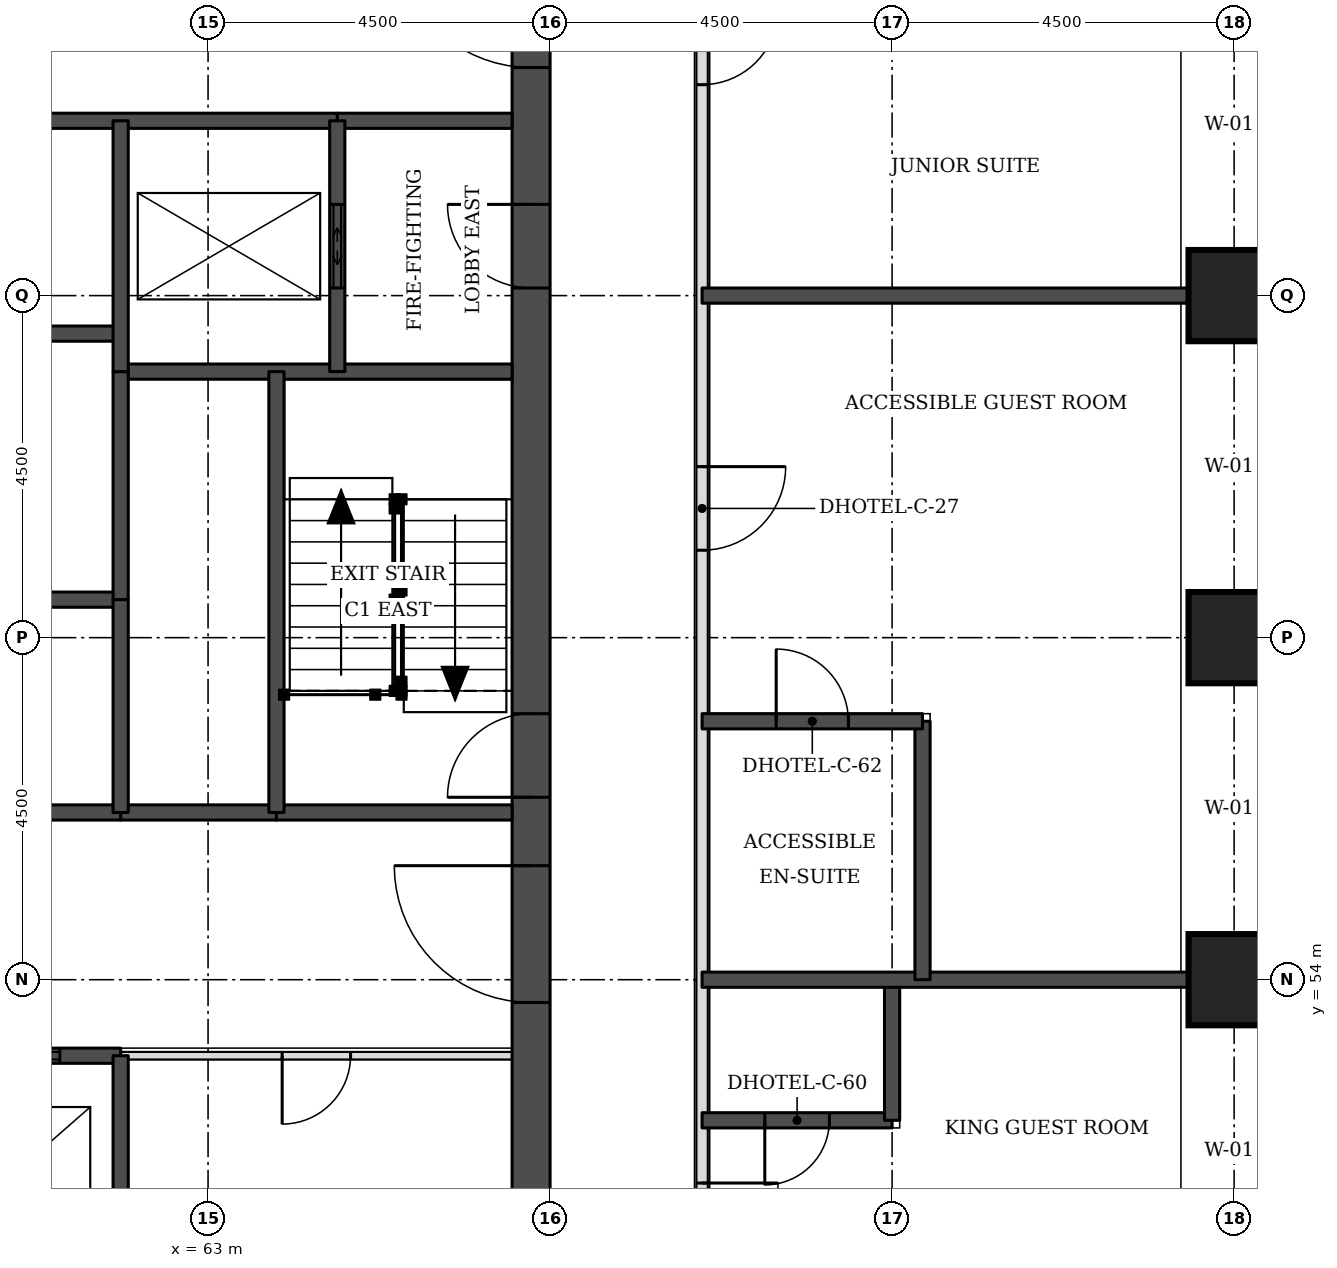
"""IFC4 building model, lengths in metres.
Left out: names, types, materials, properties, quantities, classifications, styles, units other than length and angle.
Written with IfcOpenShell. Run it as: python <this file> out.ifc"""

import sys

from ifc_helpers import new_model, si_unit, direction, frame, frame_2d, origin, origin_2d, place, context, subcontext, project, spatial, rectangle, extrude, element, fill, save


model = new_model("IFC4")
c1 = context("Model", 3, precision=1e-05, world=origin(), true_north=direction((0.0, 1.0)))
c2 = subcontext(c1, "Body", "Model", "MODEL_VIEW")
j1 = project(units=[si_unit("LENGTHUNIT", "METRE"), si_unit("PLANEANGLEUNIT", "RADIAN")], contexts=[c1])
p1 = place(None, origin())
s1 = spatial("IfcSite", under=j1, at=p1, CompositionType="ELEMENT")
p2 = place(p1, origin())
s2 = spatial("IfcBuilding", under=s1, at=p2, CompositionType="ELEMENT")
p3 = place(p2, frame((0.0, 0.0, 33.0)))
s3 = spatial("IfcBuildingStorey", under=s2, at=p3, CompositionType="ELEMENT", Elevation=33.0)
for number, where, z_axis, x_axis in (
    (1, (76.5, 54.0, 0.0), (0.0, 0.0, 1.0), (1.0, 0.0, 0.0)),
    (2, (76.5, 58.5, 0.0), (0.0, 0.0, 1.0), (1.0, 0.0, 0.0)),
    (3, (76.5, 63.0, 0.0), (0.0, 0.0, 1.0), (1.0, 0.0, 0.0)),
):
    element("IfcColumn", number, at=place(p3, frame(where, z_axis=z_axis, x_axis=x_axis)), inside=s3, PredefinedType="COLUMN", context=c2, shape_type="SweptSolid", body=[
        extrude(rectangle(XDim=1.2, YDim=1.2, at=origin_2d()), origin(), (0.0, 0.0, 1.0), 3.3),
    ])
p4 = place(p3, frame((67.25, 49.5, 0.0), z_axis=(0.0, 0.0, 1.0), x_axis=(0.0, 1.0, 0.0)))
e4 = element("IfcWall", 4, at=p4, inside=s3, PredefinedType="SHEAR", context=c2, shape_type="SweptSolid", body=[
    extrude(rectangle(XDim=22.5, YDim=0.5, at=frame_2d((11.25, 0.0))), origin(), (0.0, 0.0, 1.0), 3.3),
])
p5 = place(p4, frame((4.2, 0.0, 0.0)))
e5 = element("IfcOpeningElement", 5, at=p5, cuts=e4, PredefinedType="OPENING", context=c2, shape_type="SweptSolid", body=[
    extrude(rectangle(XDim=1.8, YDim=2.1, at=frame_2d((0.9, 1.05))), frame((0.0, 0.26, 0.0), z_axis=(0.0, -1.0, 0.0), x_axis=(1.0, 0.0, 0.0)), (0.0, 0.0, 1.0), 0.52),
])
p6 = place(p4, frame((6.9, 0.0, 0.0)))
e6 = element("IfcOpeningElement", 6, at=p6, cuts=e4, PredefinedType="OPENING", context=c2, shape_type="SweptSolid", body=[
    extrude(rectangle(XDim=1.1, YDim=2.1, at=frame_2d((0.55, 1.05))), frame((0.0, 0.26, 0.0), z_axis=(0.0, -1.0, 0.0), x_axis=(1.0, 0.0, 0.0)), (0.0, 0.0, 1.0), 0.52),
])
p7 = place(p4, frame((13.6, 0.0, 0.0)))
e7 = element("IfcOpeningElement", 7, at=p7, cuts=e4, PredefinedType="OPENING", context=c2, shape_type="SweptSolid", body=[
    extrude(rectangle(XDim=1.1, YDim=2.1, at=frame_2d((0.55, 1.05))), frame((0.0, 0.26, 0.0), z_axis=(0.0, -1.0, 0.0), x_axis=(1.0, 0.0, 0.0)), (0.0, 0.0, 1.0), 0.52),
])
p8 = place(p4, frame((16.5, 0.0, 0.0)))
e8 = element("IfcOpeningElement", 8, at=p8, cuts=e4, PredefinedType="OPENING", context=c2, shape_type="SweptSolid", body=[
    extrude(rectangle(XDim=1.8, YDim=2.1, at=frame_2d((0.9, 1.05))), frame((0.0, 0.26, 0.0), z_axis=(0.0, -1.0, 0.0), x_axis=(1.0, 0.0, 0.0)), (0.0, 0.0, 1.0), 0.52),
])
p9 = place(p3, frame((69.5, 47.5, 0.0), z_axis=(0.0, 0.0, 1.0), x_axis=(0.0, 1.0, 0.0)))
e9 = element("IfcWall", 9, at=p9, inside=s3, PredefinedType="PARTITIONING", context=c2, shape_type="SweptSolid", body=[
    extrude(rectangle(XDim=26.5, YDim=0.15, at=frame_2d((13.25, 0.0))), origin(), (0.0, 0.0, 1.0), 3.08),
])
p10 = place(p9, frame((25.053, 0.0, 0.0)))
e10 = element("IfcOpeningElement", 10, at=p10, cuts=e9, PredefinedType="OPENING", context=c2, shape_type="SweptSolid", body=[
    extrude(rectangle(XDim=1.0, YDim=2.1, at=frame_2d((0.5, 1.05))), frame((0.0, 0.085, 0.0), z_axis=(0.0, -1.0, 0.0), x_axis=(1.0, 0.0, 0.0)), (0.0, 0.0, 1.0), 0.17),
])
p11 = place(p9, frame((18.275, 0.0, 0.0)))
e11 = element("IfcOpeningElement", 11, at=p11, cuts=e9, PredefinedType="OPENING", context=c2, shape_type="SweptSolid", body=[
    extrude(rectangle(XDim=1.0, YDim=2.1, at=frame_2d((0.5, 1.05))), frame((0.0, 0.085, 0.0), z_axis=(0.0, -1.0, 0.0), x_axis=(1.0, 0.0, 0.0)), (0.0, 0.0, 1.0), 0.17),
])
p12 = place(p9, frame((12.15, 0.0, 0.0)))
e12 = element("IfcOpeningElement", 12, at=p12, cuts=e9, PredefinedType="OPENING", context=c2, shape_type="SweptSolid", body=[
    extrude(rectangle(XDim=1.1, YDim=2.1, at=frame_2d((0.55, 1.05))), frame((0.0, 0.085, 0.0), z_axis=(0.0, -1.0, 0.0), x_axis=(1.0, 0.0, 0.0)), (0.0, 0.0, 1.0), 0.17),
])
p13 = place(p9, frame((2.825, 0.0, 0.0)))
e13 = element("IfcOpeningElement", 13, at=p13, cuts=e9, PredefinedType="OPENING", context=c2, shape_type="SweptSolid", body=[
    extrude(rectangle(XDim=1.0, YDim=2.1, at=frame_2d((0.5, 1.05))), frame((0.0, 0.085, 0.0), z_axis=(0.0, -1.0, 0.0), x_axis=(1.0, 0.0, 0.0)), (0.0, 0.0, 1.0), 0.17),
])
p14 = place(p9, frame((0.447, 0.0, 0.0)))
e14 = element("IfcOpeningElement", 14, at=p14, cuts=e9, PredefinedType="OPENING", context=c2, shape_type="SweptSolid", body=[
    extrude(rectangle(XDim=1.0, YDim=2.1, at=frame_2d((0.5, 1.05))), frame((0.0, 0.085, 0.0), z_axis=(0.0, -1.0, 0.0), x_axis=(1.0, 0.0, 0.0)), (0.0, 0.0, 1.0), 0.17),
])
p15 = place(p3, frame((69.5, 52.15, 0.0), z_axis=(0.0, 0.0, 1.0), x_axis=(1.0, 0.0, 0.0)))
e15 = element("IfcWall", 15, at=p15, inside=s3, PredefinedType="SOLIDWALL", context=c2, shape_type="SweptSolid", body=[
    extrude(rectangle(XDim=2.5, YDim=0.2, at=frame_2d((1.25, 0.0))), origin(), (0.0, 0.0, 1.0), 3.08),
])
p16 = place(p15, frame((0.825, 0.0, 0.0)))
e16 = element("IfcOpeningElement", 16, at=p16, cuts=e15, PredefinedType="OPENING", context=c2, shape_type="SweptSolid", body=[
    extrude(rectangle(XDim=0.85, YDim=2.1, at=frame_2d((0.425, 1.05))), frame((0.0, 0.11, 0.0), z_axis=(0.0, -1.0, 0.0), x_axis=(1.0, 0.0, 0.0)), (0.0, 0.0, 1.0), 0.22),
])
p17 = place(p3, frame((72.0, 52.15, 0.0), z_axis=(0.0, 0.0, 1.0), x_axis=(0.0, 1.0, 0.0)))
e17 = element("IfcWall", 17, at=p17, inside=s3, PredefinedType="SOLIDWALL", context=c2, shape_type="SweptSolid", body=[
    extrude(rectangle(XDim=1.85, YDim=0.2, at=frame_2d((0.925, 0.0))), origin(), (0.0, 0.0, 1.0), 3.08),
])
p18 = place(p3, frame((69.5, 54.0, 0.0), z_axis=(0.0, 0.0, 1.0), x_axis=(1.0, 0.0, 0.0)))
e18 = element("IfcWall", 18, at=p18, inside=s3, PredefinedType="SOLIDWALL", context=c2, shape_type="SweptSolid", body=[
    extrude(rectangle(XDim=6.4, YDim=0.2, at=frame_2d((3.2, 0.0))), origin(), (0.0, 0.0, 1.0), 3.08),
])
p19 = place(p3, frame((72.4, 54.0, 0.0), z_axis=(0.0, 0.0, 1.0), x_axis=(0.0, 1.0, 0.0)))
e19 = element("IfcWall", 19, at=p19, inside=s3, PredefinedType="SOLIDWALL", context=c2, shape_type="SweptSolid", body=[
    extrude(rectangle(XDim=3.4, YDim=0.2, at=frame_2d((1.7, 0.0))), origin(), (0.0, 0.0, 1.0), 3.08),
])
p20 = place(p3, frame((69.5, 57.4, 0.0), z_axis=(0.0, 0.0, 1.0), x_axis=(1.0, 0.0, 0.0)))
e20 = element("IfcWall", 20, at=p20, inside=s3, PredefinedType="SOLIDWALL", context=c2, shape_type="SweptSolid", body=[
    extrude(rectangle(XDim=2.9, YDim=0.2, at=frame_2d((1.45, 0.0))), origin(), (0.0, 0.0, 1.0), 3.08),
])
p21 = place(p20, frame((0.975, 0.0, 0.0)))
e21 = element("IfcOpeningElement", 21, at=p21, cuts=e20, PredefinedType="OPENING", context=c2, shape_type="SweptSolid", body=[
    extrude(rectangle(XDim=0.95, YDim=2.1, at=frame_2d((0.475, 1.05))), frame((0.0, 0.11, 0.0), z_axis=(0.0, -1.0, 0.0), x_axis=(1.0, 0.0, 0.0)), (0.0, 0.0, 1.0), 0.22),
])
p22 = place(p3, frame((69.5, 63.0, 0.0), z_axis=(0.0, 0.0, 1.0), x_axis=(1.0, 0.0, 0.0)))
e22 = element("IfcWall", 22, at=p22, inside=s3, PredefinedType="SOLIDWALL", context=c2, shape_type="SweptSolid", body=[
    extrude(rectangle(XDim=6.4, YDim=0.2, at=frame_2d((3.2, 0.0))), origin(), (0.0, 0.0, 1.0), 3.08),
])
p23 = place(p3, frame((61.85, 53.0, 0.0), z_axis=(0.0, 0.0, 1.0), x_axis=(1.0, 0.0, 0.0)))
e23 = element("IfcWall", 23, at=p23, inside=s3, PredefinedType="PARTITIONING", context=c2, shape_type="SweptSolid", body=[
    extrude(rectangle(XDim=5.15, YDim=0.1, at=frame_2d((2.575, 0.0))), origin(), (0.0, 0.0, 1.0), 3.08),
])
p24 = place(p23, frame((2.125, 0.0, 0.0)))
e24 = element("IfcOpeningElement", 24, at=p24, cuts=e23, PredefinedType="OPENING", context=c2, shape_type="SweptSolid", body=[
    extrude(rectangle(XDim=0.9, YDim=2.1, at=frame_2d((0.45, 1.05))), frame((0.0, 0.06, 0.0), z_axis=(0.0, -1.0, 0.0), x_axis=(1.0, 0.0, 0.0)), (0.0, 0.0, 1.0), 0.12),
])
p25 = place(p3, frame((50.65, 53.0, 0.0), z_axis=(0.0, 0.0, 1.0), x_axis=(1.0, 0.0, 0.0)))
e25 = element("IfcWall", 25, at=p25, inside=s3, PredefinedType="SOLIDWALL", context=c2, shape_type="SweptSolid", body=[
    extrude(rectangle(XDim=11.2, YDim=0.2, at=frame_2d((5.6, 0.0))), origin(), (0.0, 0.0, 1.0), 3.08),
])
p26 = place(p25, frame((0.8, 0.0, 0.0)))
e26 = element("IfcOpeningElement", 26, at=p26, cuts=e25, PredefinedType="OPENING", context=c2, shape_type="SweptSolid", body=[
    extrude(rectangle(XDim=1.2, YDim=2.1, at=frame_2d((0.6, 1.05))), frame((0.0, 0.11, 0.0), z_axis=(0.0, -1.0, 0.0), x_axis=(1.0, 0.0, 0.0)), (0.0, 0.0, 1.0), 0.22),
])
p27 = place(p25, frame((3.6, 0.0, 0.0)))
e27 = element("IfcOpeningElement", 27, at=p27, cuts=e25, PredefinedType="OPENING", context=c2, shape_type="SweptSolid", body=[
    extrude(rectangle(XDim=1.2, YDim=2.1, at=frame_2d((0.6, 1.05))), frame((0.0, 0.11, 0.0), z_axis=(0.0, -1.0, 0.0), x_axis=(1.0, 0.0, 0.0)), (0.0, 0.0, 1.0), 0.22),
])
p28 = place(p25, frame((6.4, 0.0, 0.0)))
e28 = element("IfcOpeningElement", 28, at=p28, cuts=e25, PredefinedType="OPENING", context=c2, shape_type="SweptSolid", body=[
    extrude(rectangle(XDim=1.2, YDim=2.1, at=frame_2d((0.6, 1.05))), frame((0.0, 0.11, 0.0), z_axis=(0.0, -1.0, 0.0), x_axis=(1.0, 0.0, 0.0)), (0.0, 0.0, 1.0), 0.22),
])
p29 = place(p25, frame((9.2, 0.0, 0.0)))
e29 = element("IfcOpeningElement", 29, at=p29, cuts=e25, PredefinedType="OPENING", context=c2, shape_type="SweptSolid", body=[
    extrude(rectangle(XDim=1.2, YDim=2.1, at=frame_2d((0.6, 1.05))), frame((0.0, 0.11, 0.0), z_axis=(0.0, -1.0, 0.0), x_axis=(1.0, 0.0, 0.0)), (0.0, 0.0, 1.0), 0.22),
])
p30 = place(p3, frame((61.85, 56.2, 0.0), z_axis=(0.0, 0.0, 1.0), x_axis=(1.0, 0.0, 0.0)))
e30 = element("IfcWall", 30, at=p30, inside=s3, PredefinedType="SOLIDWALL", context=c2, shape_type="SweptSolid", body=[
    extrude(rectangle(XDim=2.05, YDim=0.2, at=frame_2d((1.025, 0.0))), origin(), (0.0, 0.0, 1.0), 3.08),
])
p31 = place(p3, frame((50.65, 56.2, 0.0), z_axis=(0.0, 0.0, 1.0), x_axis=(1.0, 0.0, 0.0)))
e31 = element("IfcWall", 31, at=p31, inside=s3, PredefinedType="SOLIDWALL", context=c2, shape_type="SweptSolid", body=[
    extrude(rectangle(XDim=11.2, YDim=0.2, at=frame_2d((5.6, 0.0))), origin(), (0.0, 0.0, 1.0), 3.08),
])
p32 = place(p3, frame((63.9, 56.2, 0.0), z_axis=(0.0, 0.0, 1.0), x_axis=(1.0, 0.0, 0.0)))
e32 = element("IfcWall", 32, at=p32, inside=s3, PredefinedType="SOLIDWALL", context=c2, shape_type="SweptSolid", body=[
    extrude(rectangle(XDim=3.1, YDim=0.2, at=frame_2d((1.55, 0.0))), origin(), (0.0, 0.0, 1.0), 3.08),
])
p33 = place(p3, frame((50.65, 59.0, 0.0), z_axis=(0.0, 0.0, 1.0), x_axis=(1.0, 0.0, 0.0)))
e33 = element("IfcWall", 33, at=p33, inside=s3, PredefinedType="SOLIDWALL", context=c2, shape_type="SweptSolid", body=[
    extrude(rectangle(XDim=11.2, YDim=0.2, at=frame_2d((5.6, 0.0))), origin(), (0.0, 0.0, 1.0), 3.3),
])
p34 = place(p3, frame((61.85, 62.0, 0.0), z_axis=(0.0, 0.0, 1.0), x_axis=(1.0, 0.0, 0.0)))
e34 = element("IfcWall", 34, at=p34, inside=s3, PredefinedType="SOLIDWALL", context=c2, shape_type="SweptSolid", body=[
    extrude(rectangle(XDim=5.15, YDim=0.2, at=frame_2d((2.575, 0.0))), origin(), (0.0, 0.0, 1.0), 3.08),
])
p35 = place(p3, frame((50.65, 62.5, 0.0), z_axis=(0.0, 0.0, 1.0), x_axis=(1.0, 0.0, 0.0)))
e35 = element("IfcWall", 35, at=p35, inside=s3, PredefinedType="SOLIDWALL", context=c2, shape_type="SweptSolid", body=[
    extrude(rectangle(XDim=11.2, YDim=0.2, at=frame_2d((5.6, 0.0))), origin(), (0.0, 0.0, 1.0), 3.3),
])
p36 = place(p3, frame((64.7, 65.3, 0.0), z_axis=(0.0, 0.0, 1.0), x_axis=(1.0, 0.0, 0.0)))
e36 = element("IfcWall", 36, at=p36, inside=s3, PredefinedType="SOLIDWALL", context=c2, shape_type="SweptSolid", body=[
    extrude(rectangle(XDim=2.3, YDim=0.2, at=frame_2d((1.15, 0.0))), origin(), (0.0, 0.0, 1.0), 3.08),
])
p37 = place(p3, frame((47.8, 65.3, 0.0), z_axis=(0.0, 0.0, 1.0), x_axis=(1.0, 0.0, 0.0)))
e37 = element("IfcWall", 37, at=p37, inside=s3, PredefinedType="SOLIDWALL", context=c2, shape_type="SweptSolid", body=[
    extrude(rectangle(XDim=16.9, YDim=0.2, at=frame_2d((8.45, 0.0))), origin(), (0.0, 0.0, 1.0), 3.08),
])
p38 = place(p3, frame((61.85, 59.0, 0.0), z_axis=(0.0, 0.0, 1.0), x_axis=(0.0, 1.0, 0.0)))
e38 = element("IfcWall", 38, at=p38, inside=s3, PredefinedType="SOLIDWALL", context=c2, shape_type="SweptSolid", body=[
    extrude(rectangle(XDim=3.0, YDim=0.2, at=frame_2d((1.5, 0.0))), origin(), (0.0, 0.0, 1.0), 3.3),
])
p39 = place(p3, frame((61.85, 50.0, 0.0), z_axis=(0.0, 0.0, 1.0), x_axis=(0.0, 1.0, 0.0)))
e39 = element("IfcWall", 39, at=p39, inside=s3, PredefinedType="SOLIDWALL", context=c2, shape_type="SweptSolid", body=[
    extrude(rectangle(XDim=3.0, YDim=0.2, at=frame_2d((1.5, 0.0))), origin(), (0.0, 0.0, 1.0), 3.08),
])
p40 = place(p3, frame((61.85, 56.2, 0.0), z_axis=(0.0, 0.0, 1.0), x_axis=(0.0, 1.0, 0.0)))
e40 = element("IfcWall", 40, at=p40, inside=s3, PredefinedType="SOLIDWALL", context=c2, shape_type="SweptSolid", body=[
    extrude(rectangle(XDim=2.8, YDim=0.2, at=frame_2d((1.4, 0.0))), origin(), (0.0, 0.0, 1.0), 3.08),
])
p41 = place(p3, frame((61.85, 62.0, 0.0), z_axis=(0.0, 0.0, 1.0), x_axis=(0.0, 1.0, 0.0)))
e41 = element("IfcWall", 41, at=p41, inside=s3, PredefinedType="SOLIDWALL", context=c2, shape_type="SweptSolid", body=[
    extrude(rectangle(XDim=3.3, YDim=0.2, at=frame_2d((1.65, 0.0))), origin(), (0.0, 0.0, 1.0), 3.08),
])
p42 = place(p3, frame((63.9, 56.2, 0.0), z_axis=(0.0, 0.0, 1.0), x_axis=(0.0, 1.0, 0.0)))
e42 = element("IfcWall", 42, at=p42, inside=s3, PredefinedType="SOLIDWALL", context=c2, shape_type="SweptSolid", body=[
    extrude(rectangle(XDim=5.8, YDim=0.2, at=frame_2d((2.9, 0.0))), origin(), (0.0, 0.0, 1.0), 3.08),
])
p43 = place(p3, frame((64.7, 62.0, 0.0), z_axis=(0.0, 0.0, 1.0), x_axis=(0.0, 1.0, 0.0)))
e43 = element("IfcWall", 43, at=p43, inside=s3, PredefinedType="SOLIDWALL", context=c2, shape_type="SweptSolid", body=[
    extrude(rectangle(XDim=3.3, YDim=0.2, at=frame_2d((1.65, 0.0))), origin(), (0.0, 0.0, 1.0), 3.08),
])
p44 = place(p43, frame((1.1, 0.0, 0.0)))
e44 = element("IfcOpeningElement", 44, at=p44, cuts=e43, PredefinedType="OPENING", context=c2, shape_type="SweptSolid", body=[
    extrude(rectangle(XDim=1.1, YDim=2.1, at=frame_2d((0.55, 1.05))), frame((0.0, 0.11, 0.0), z_axis=(0.0, -1.0, 0.0), x_axis=(1.0, 0.0, 0.0)), (0.0, 0.0, 1.0), 0.22),
])
p45 = place(p11, frame((1.0, 0.0, 0.0), z_axis=(0.0, 0.0, 1.0), x_axis=(-1.0, 0.0, 0.0)))
e45 = element("IfcDoor", 45, at=p45, inside=s3, OperationType="SINGLE_SWING_LEFT", PredefinedType="DOOR", context=c2, shape_type="SweptSolid", body=[
    extrude(rectangle(XDim=1.0, YDim=2.1, at=frame_2d((0.5, 1.05))), frame((0.0, 0.025, 0.0), z_axis=(0.0, -1.0, 0.0), x_axis=(1.0, 0.0, 0.0)), (0.0, 0.0, 1.0), 0.05),
])
fill(e11, e45)
p46 = place(p12, frame((1.1, 0.0, 0.0), z_axis=(0.0, 0.0, 1.0), x_axis=(-1.0, 0.0, 0.0)))
e46 = element("IfcDoor", 46, at=p46, inside=s3, OperationType="SINGLE_SWING_LEFT", PredefinedType="DOOR", context=c2, shape_type="SweptSolid", body=[
    extrude(rectangle(XDim=1.1, YDim=2.1, at=frame_2d((0.55, 1.05))), frame((0.0, 0.025, 0.0), z_axis=(0.0, -1.0, 0.0), x_axis=(1.0, 0.0, 0.0)), (0.0, 0.0, 1.0), 0.05),
])
fill(e12, e46)
p47 = place(p21, origin())
e47 = element("IfcDoor", 47, at=p47, inside=s3, OperationType="SINGLE_SWING_LEFT", PredefinedType="DOOR", context=c2, shape_type="SweptSolid", body=[
    extrude(rectangle(XDim=0.95, YDim=2.1, at=frame_2d((0.475, 1.05))), frame((0.0, 0.025, 0.0), z_axis=(0.0, -1.0, 0.0), x_axis=(1.0, 0.0, 0.0)), (0.0, 0.0, 1.0), 0.05),
])
fill(e21, e47)
p48 = place(p13, frame((1.0, 0.0, 0.0), z_axis=(0.0, 0.0, 1.0), x_axis=(-1.0, 0.0, 0.0)))
e48 = element("IfcDoor", 48, at=p48, inside=s3, OperationType="SINGLE_SWING_LEFT", PredefinedType="DOOR", context=c2, shape_type="SweptSolid", body=[
    extrude(rectangle(XDim=1.0, YDim=2.1, at=frame_2d((0.5, 1.05))), frame((0.0, 0.025, 0.0), z_axis=(0.0, -1.0, 0.0), x_axis=(1.0, 0.0, 0.0)), (0.0, 0.0, 1.0), 0.05),
])
fill(e13, e48)
p49 = place(p16, frame((0.85, 0.0, 0.0), z_axis=(0.0, 0.0, 1.0), x_axis=(-1.0, 0.0, 0.0)))
e49 = element("IfcDoor", 49, at=p49, inside=s3, OperationType="SINGLE_SWING_RIGHT", PredefinedType="DOOR", context=c2, shape_type="SweptSolid", body=[
    extrude(rectangle(XDim=0.85, YDim=2.1, at=frame_2d((0.425, 1.05))), frame((0.0, 0.025, 0.0), z_axis=(0.0, -1.0, 0.0), x_axis=(1.0, 0.0, 0.0)), (0.0, 0.0, 1.0), 0.05),
])
fill(e16, e49)
p50 = place(p29, origin())
e50 = element("IfcDoor", 50, at=p50, inside=s3, OperationType="DOUBLE_DOOR_SLIDING", PredefinedType="DOOR", context=c2, shape_type="SweptSolid", body=[
    extrude(rectangle(XDim=1.2, YDim=2.1, at=frame_2d((0.6, 1.05))), frame((0.0, 0.025, 0.0), z_axis=(0.0, -1.0, 0.0), x_axis=(1.0, 0.0, 0.0)), (0.0, 0.0, 1.0), 0.05),
])
fill(e29, e50)
p51 = place(p44, origin())
e51 = element("IfcDoor", 51, at=p51, inside=s3, OperationType="DOUBLE_DOOR_SLIDING", PredefinedType="DOOR", context=c2, shape_type="SweptSolid", body=[
    extrude(rectangle(XDim=1.1, YDim=2.1, at=frame_2d((0.55, 1.05))), frame((0.0, 0.025, 0.0), z_axis=(0.0, -1.0, 0.0), x_axis=(1.0, 0.0, 0.0)), (0.0, 0.0, 1.0), 0.05),
])
fill(e44, e51)
p52 = place(p5, origin())
e52 = element("IfcDoor", 52, at=p52, inside=s3, OperationType="SINGLE_SWING_RIGHT", PredefinedType="DOOR", context=c2, shape_type="SweptSolid", body=[
    extrude(rectangle(XDim=1.8, YDim=2.1, at=frame_2d((0.9, 1.05))), frame((0.0, 0.025, 0.0), z_axis=(0.0, -1.0, 0.0), x_axis=(1.0, 0.0, 0.0)), (0.0, 0.0, 1.0), 0.05),
])
fill(e5, e52)
p53 = place(p6, origin())
e53 = element("IfcDoor", 53, at=p53, inside=s3, OperationType="SINGLE_SWING_LEFT", PredefinedType="DOOR", context=c2, shape_type="SweptSolid", body=[
    extrude(rectangle(XDim=1.1, YDim=2.1, at=frame_2d((0.55, 1.05))), frame((0.0, 0.025, 0.0), z_axis=(0.0, -1.0, 0.0), x_axis=(1.0, 0.0, 0.0)), (0.0, 0.0, 1.0), 0.05),
])
fill(e6, e53)
p54 = place(p7, origin())
e54 = element("IfcDoor", 54, at=p54, inside=s3, OperationType="SINGLE_SWING_RIGHT", PredefinedType="DOOR", context=c2, shape_type="SweptSolid", body=[
    extrude(rectangle(XDim=1.1, YDim=2.1, at=frame_2d((0.55, 1.05))), frame((0.0, 0.025, 0.0), z_axis=(0.0, -1.0, 0.0), x_axis=(1.0, 0.0, 0.0)), (0.0, 0.0, 1.0), 0.05),
])
fill(e7, e54)
p55 = place(p8, origin())
e55 = element("IfcDoor", 55, at=p55, inside=s3, OperationType="SINGLE_SWING_RIGHT", PredefinedType="DOOR", context=c2, shape_type="SweptSolid", body=[
    extrude(rectangle(XDim=1.8, YDim=2.1, at=frame_2d((0.9, 1.05))), frame((0.0, 0.025, 0.0), z_axis=(0.0, -1.0, 0.0), x_axis=(1.0, 0.0, 0.0)), (0.0, 0.0, 1.0), 0.05),
])
fill(e8, e55)
p56 = place(p24, frame((0.9, 0.0, 0.0), z_axis=(0.0, 0.0, 1.0), x_axis=(-1.0, 0.0, 0.0)))
e56 = element("IfcDoor", 56, at=p56, inside=s3, OperationType="SINGLE_SWING_RIGHT", PredefinedType="DOOR", context=c2, shape_type="SweptSolid", body=[
    extrude(rectangle(XDim=0.9, YDim=2.1, at=frame_2d((0.45, 1.05))), frame((0.0, 0.025, 0.0), z_axis=(0.0, -1.0, 0.0), x_axis=(1.0, 0.0, 0.0)), (0.0, 0.0, 1.0), 0.05),
])
fill(e24, e56)
save(model, sys.argv[1])
